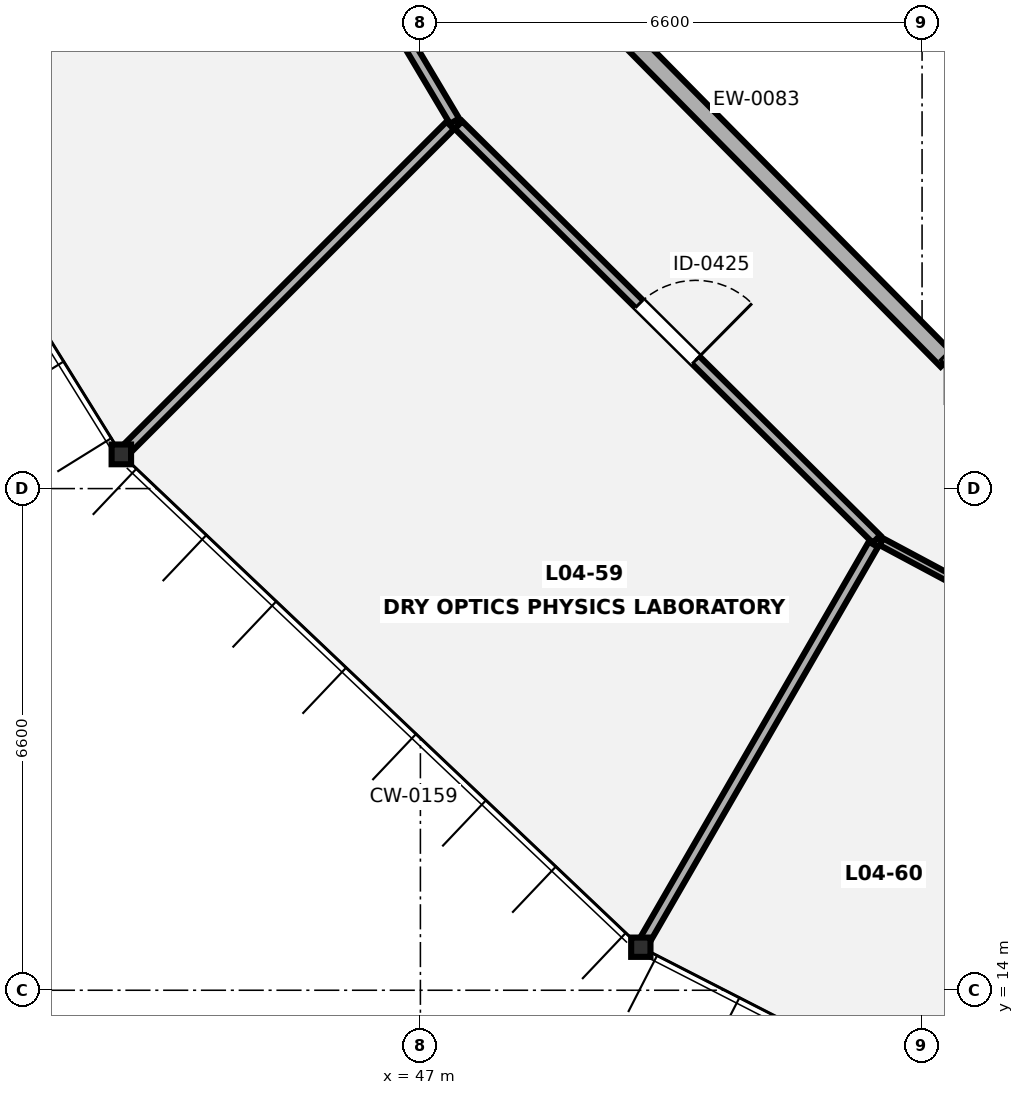
"""IFC4 building model, lengths in metres.
Left out: names, types, materials, properties, quantities, classifications, styles, units other than length and angle.
Written with IfcOpenShell. Run it as: python <this file> out.ifc"""

import sys

from ifc_helpers import new_model, si_unit, direction, frame, frame_2d, origin, origin_2d, place, context, subcontext, project, spatial, rectangle, i_section, extrude, element, fill, save


model = new_model("IFC4")
c1 = context("Model", 3, precision=1e-05, world=origin(), true_north=direction((0.0, 1.0)))
c2 = subcontext(c1, "Body", "Model", "MODEL_VIEW")
j1 = project(units=[si_unit("LENGTHUNIT", "METRE"), si_unit("PLANEANGLEUNIT", "RADIAN")], contexts=[c1])
p1 = place(None, origin())
s1 = spatial("IfcSite", under=j1, at=p1, CompositionType="ELEMENT")
p2 = place(p1, origin())
s2 = spatial("IfcBuilding", under=s1, at=p2, CompositionType="ELEMENT")
p3 = place(p2, frame((0.0, 0.0, 17.5)))
s3 = spatial("IfcBuildingStorey", under=s2, at=p3, CompositionType="ELEMENT", Elevation=17.5)
p4 = place(p3, frame((43.065, 21.05, 0.0), z_axis=(0.0, 0.0, 1.0), x_axis=(1.0, 0.0, 0.0)))
e1 = element("IfcColumn", 1, at=p4, inside=s3, PredefinedType="COLUMN", context=c2, shape_type="SweptSolid", body=[
    extrude(i_section(OverallWidth=0.256, OverallDepth=0.26, WebThickness=0.01, FlangeThickness=0.017, FilletRadius=0.014, at=origin_2d()), origin(), (0.0, 0.0, 1.0), 4.2),
])
p5 = place(p3, frame((49.9, 14.566, 0.0), z_axis=(0.0, 0.0, 1.0), x_axis=(1.0, 0.0, 0.0)))
e2 = element("IfcColumn", 2, at=p5, inside=s3, PredefinedType="COLUMN", context=c2, shape_type="SweptSolid", body=[
    extrude(i_section(OverallWidth=0.254, OverallDepth=0.254, WebThickness=0.009, FlangeThickness=0.014, FilletRadius=0.014, at=origin_2d()), origin(), (0.0, 0.0, 1.0), 4.2),
])
p6 = place(p3, frame((49.248, 27.029, 0.0), z_axis=(0.0, 0.0, 1.0), x_axis=(0.702641034555, -0.711544500759, 0.0)))
e3 = element("IfcWall", 3, at=p6, inside=s3, PredefinedType="SOLIDWALL", context=c2, shape_type="SweptSolid", body=[
    extrude(rectangle(XDim=6.663, YDim=0.24, at=frame_2d((3.332, 0.0))), origin(), (0.0, 0.0, 1.0), 3.65),
])
p7 = place(p3, frame((43.191, 32.598, 0.0), z_axis=(0.0, 0.0, 1.0), x_axis=(0.510915698067, -0.859630821614, 0.0)))
e4 = element("IfcWall", 4, at=p7, inside=s3, PredefinedType="PARTITIONING", context=c2, shape_type="SweptSolid", body=[
    extrude(rectangle(XDim=8.334, YDim=0.14, at=frame_2d((4.167, 0.0))), origin(), (0.0, 0.0, 1.0), 4.0),
])
p8 = place(p3, frame((47.393, 25.377, 0.0), z_axis=(0.0, 0.0, 1.0), x_axis=(-0.707086637129, -0.70712692467, 0.0)))
e5 = element("IfcWall", 5, at=p8, inside=s3, PredefinedType="PARTITIONING", context=c2, shape_type="SweptSolid", body=[
    extrude(rectangle(XDim=6.06, YDim=0.14, at=frame_2d((3.03, 0.0))), origin(), (0.0, 0.0, 1.0), 3.465),
])
p9 = place(p3, frame((47.501, 25.383, 0.0), z_axis=(0.0, 0.0, 1.0), x_axis=(0.71042636545, -0.703771539119, 0.0)))
e6 = element("IfcWall", 6, at=p9, inside=s3, PredefinedType="PARTITIONING", context=c2, shape_type="SweptSolid", body=[
    extrude(rectangle(XDim=7.741, YDim=0.14, at=frame_2d((3.87, 0.0))), origin(), (0.0, 0.0, 1.0), 4.0),
])
p10 = place(p9, frame((3.345, 0.0, 0.0)))
e7 = element("IfcOpeningElement", 7, at=p10, cuts=e6, PredefinedType="OPENING", context=c2, shape_type="SweptSolid", body=[
    extrude(rectangle(XDim=1.05, YDim=2.15, at=frame_2d((0.525, 1.075))), frame((0.0, 0.08, 0.0), z_axis=(0.0, -1.0, 0.0), x_axis=(1.0, 0.0, 0.0)), (0.0, 0.0, 1.0), 0.16),
])
p11 = place(p3, frame((52.96, 19.866, 0.0), z_axis=(0.0, 0.0, 1.0), x_axis=(-0.500008418462, -0.866020543329, 0.0)))
e8 = element("IfcWall", 8, at=p11, inside=s3, PredefinedType="PARTITIONING", context=c2, shape_type="SweptSolid", body=[
    extrude(rectangle(XDim=6.06, YDim=0.14, at=frame_2d((3.03, 0.0))), origin(), (0.0, 0.0, 1.0), 3.313),
])
p12 = place(p3, frame((53.063, 19.902, 0.0), z_axis=(0.0, 0.0, 1.0), x_axis=(0.881826283139, -0.471574391125, 0.0)))
e9 = element("IfcWall", 9, at=p12, inside=s3, PredefinedType="PARTITIONING", context=c2, shape_type="SweptSolid", body=[
    extrude(rectangle(XDim=7.258, YDim=0.1, at=frame_2d((3.629, 0.0))), origin(), (0.0, 0.0, 1.0), 4.0),
])
p13 = place(p12, frame((3.129, 0.0, 0.0)))
e10 = element("IfcOpeningElement", 10, at=p13, cuts=e9, PredefinedType="OPENING", context=c2, shape_type="SweptSolid", body=[
    extrude(rectangle(XDim=1.0, YDim=2.1, at=frame_2d((0.5, 1.05))), frame((0.0, 0.06, 0.0), z_axis=(0.0, -1.0, 0.0), x_axis=(1.0, 0.0, 0.0)), (0.0, 0.0, 1.0), 0.12),
])
p14 = place(p10, origin())
e11 = element("IfcDoor", 11, at=p14, inside=s3, OperationType="SINGLE_SWING_RIGHT", PredefinedType="DOOR", context=c2, shape_type="SweptSolid", body=[
    extrude(rectangle(XDim=1.05, YDim=2.15, at=frame_2d((0.525, 1.075))), frame((0.0, 0.025, 0.0), z_axis=(0.0, -1.0, 0.0), x_axis=(1.0, 0.0, 0.0)), (0.0, 0.0, 1.0), 0.05),
])
fill(e7, e11)
save(model, sys.argv[1])
